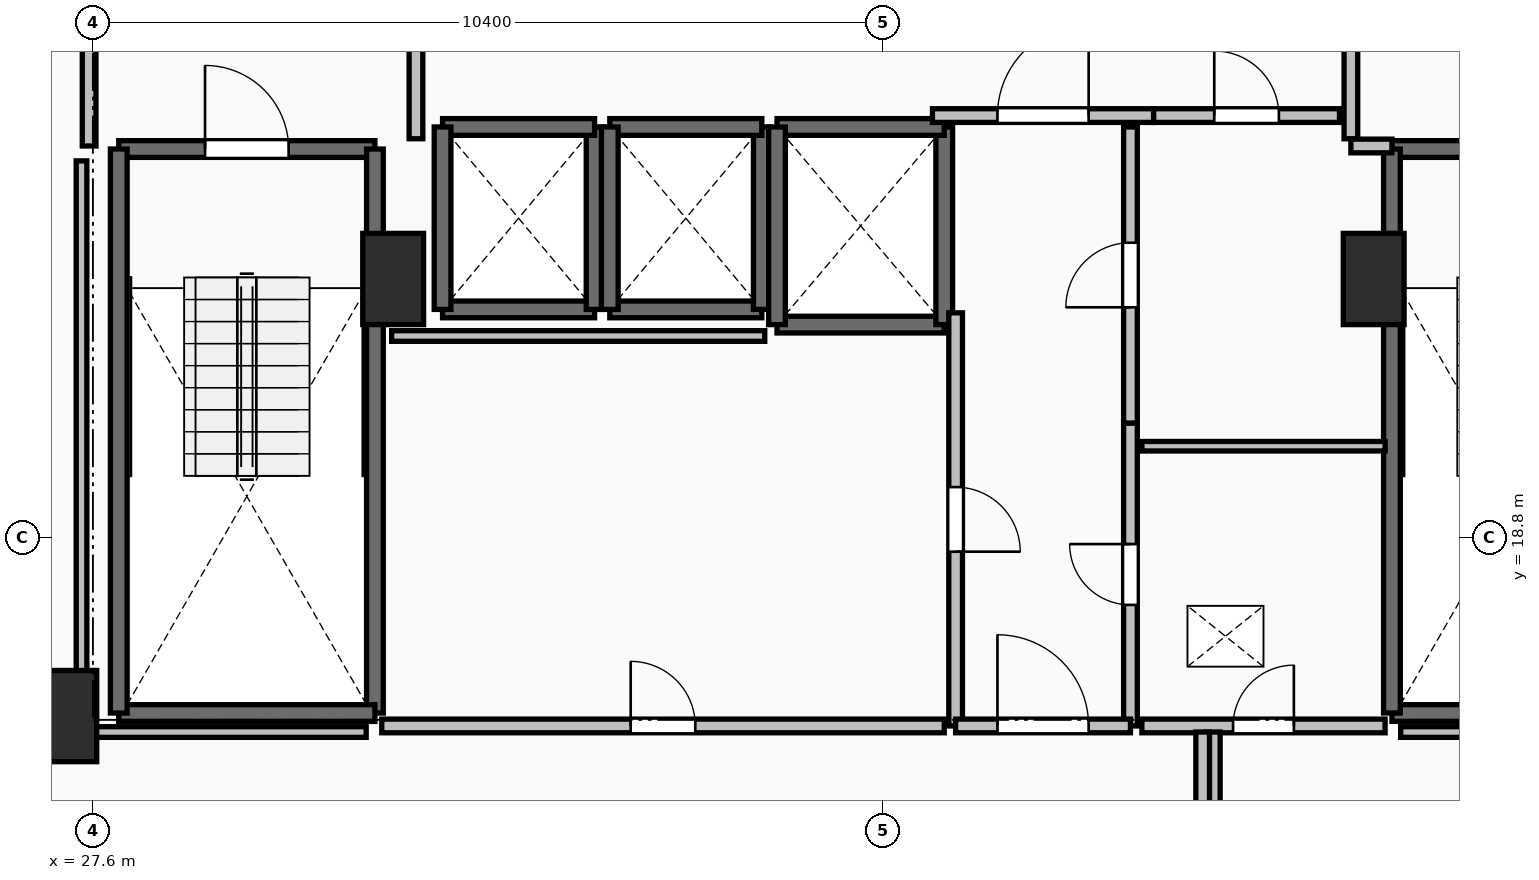
"""IFC4 building model, lengths in metres.
Left out: names, types, materials, properties, quantities, classifications, styles, units other than length and angle.
Written with IfcOpenShell. Run it as: python <this file> out.ifc"""

import sys

from ifc_helpers import new_model, si_unit, direction, frame, frame_2d, origin, origin_2d, place, context, subcontext, project, spatial, rectangle, extrude, element, fill, save


model = new_model("IFC4")
c1 = context("Model", 3, precision=1e-05, world=origin(), true_north=direction((0.0, 1.0)))
c2 = subcontext(c1, "Body", "Model", "MODEL_VIEW")
j1 = project(units=[si_unit("LENGTHUNIT", "METRE"), si_unit("PLANEANGLEUNIT", "RADIAN")], contexts=[c1])
p1 = place(None, origin())
s1 = spatial("IfcSite", under=j1, at=p1, CompositionType="ELEMENT")
p2 = place(p1, origin())
s2 = spatial("IfcBuilding", under=s1, at=p2, CompositionType="ELEMENT")
p3 = place(p2, frame((0.0, 0.0, 66.0)))
s3 = spatial("IfcBuildingStorey", under=s2, at=p3, CompositionType="ELEMENT", Elevation=66.0)
for number, where, z_axis, x_axis in (
    (1, (27.25, 16.45, 0.0), (0.0, 0.0, 1.0), (1.0, 0.0, 0.0)),
    (2, (31.55, 22.2, 0.0), (0.0, 0.0, 1.0), (1.0, 0.0, 0.0)),
    (3, (44.45, 22.2, 0.0), (0.0, 0.0, 1.0), (1.0, 0.0, 0.0)),
):
    element("IfcColumn", number, at=place(p3, frame(where, z_axis=z_axis, x_axis=x_axis)), inside=s3, PredefinedType="PILASTER", context=c2, shape_type="SweptSolid", body=[
        extrude(rectangle(XDim=0.8, YDim=1.2, at=origin_2d()), origin(), (0.0, 0.0, 1.0), 3.5),
    ])
p4 = place(p3, frame((27.94, 23.91, 0.0), z_axis=(0.0, 0.0, 1.0), x_axis=(1.0, 0.0, 0.0)))
e4 = element("IfcWall", 4, at=p4, inside=s3, PredefinedType="SOLIDWALL", context=c2, shape_type="SweptSolid", body=[
    extrude(rectangle(XDim=3.37, YDim=0.22, at=frame_2d((1.685, 0.0))), origin(), (0.0, 0.0, 1.0), 3.15),
])
p5 = place(p4, frame((1.135, 0.0, 0.0)))
e5 = element("IfcOpeningElement", 5, at=p5, cuts=e4, PredefinedType="OPENING", context=c2, shape_type="SweptSolid", body=[
    extrude(rectangle(XDim=1.1, YDim=2.15, at=frame_2d((0.55, 1.075))), frame((0.0, 0.125, 0.0), z_axis=(0.0, -1.0, 0.0), x_axis=(1.0, 0.0, 0.0)), (0.0, 0.0, 1.0), 0.25),
])
p6 = place(p3, frame((31.31, 23.91, 0.0), z_axis=(0.0, 0.0, 1.0), x_axis=(0.0, -1.0, 0.0)))
e6 = element("IfcWall", 6, at=p6, inside=s3, PredefinedType="SOLIDWALL", context=c2, shape_type="SweptSolid", body=[
    extrude(rectangle(XDim=7.42, YDim=0.22, at=frame_2d((3.71, 0.0))), origin(), (0.0, 0.0, 1.0), 3.15),
])
p7 = place(p3, frame((31.31, 16.49, 0.0), z_axis=(0.0, 0.0, 1.0), x_axis=(-1.0, 0.0, 0.0)))
e7 = element("IfcWall", 7, at=p7, inside=s3, PredefinedType="SOLIDWALL", context=c2, shape_type="SweptSolid", body=[
    extrude(rectangle(XDim=3.37, YDim=0.22, at=frame_2d((1.685, 0.0))), origin(), (0.0, 0.0, 1.0), 3.15),
])
p8 = place(p3, frame((27.94, 16.49, 0.0), z_axis=(0.0, 0.0, 1.0), x_axis=(0.0, 1.0, 0.0)))
e8 = element("IfcWall", 8, at=p8, inside=s3, PredefinedType="SOLIDWALL", context=c2, shape_type="SweptSolid", body=[
    extrude(rectangle(XDim=7.42, YDim=0.22, at=frame_2d((3.71, 0.0))), origin(), (0.0, 0.0, 1.0), 3.15),
])
p9 = place(p3, frame((44.69, 23.91, 0.0), z_axis=(0.0, 0.0, 1.0), x_axis=(1.0, 0.0, 0.0)))
e9 = element("IfcWall", 9, at=p9, inside=s3, PredefinedType="SOLIDWALL", context=c2, shape_type="SweptSolid", body=[
    extrude(rectangle(XDim=3.37, YDim=0.22, at=frame_2d((1.685, 0.0))), origin(), (0.0, 0.0, 1.0), 3.15),
])
p10 = place(p9, frame((1.135, 0.0, 0.0)))
e10 = element("IfcOpeningElement", 10, at=p10, cuts=e9, PredefinedType="OPENING", context=c2, shape_type="SweptSolid", body=[
    extrude(rectangle(XDim=1.1, YDim=2.15, at=frame_2d((0.55, 1.075))), frame((0.0, 0.125, 0.0), z_axis=(0.0, -1.0, 0.0), x_axis=(1.0, 0.0, 0.0)), (0.0, 0.0, 1.0), 0.25),
])
p11 = place(p3, frame((48.06, 16.49, 0.0), z_axis=(0.0, 0.0, 1.0), x_axis=(-1.0, 0.0, 0.0)))
e11 = element("IfcWall", 11, at=p11, inside=s3, PredefinedType="SOLIDWALL", context=c2, shape_type="SweptSolid", body=[
    extrude(rectangle(XDim=3.37, YDim=0.22, at=frame_2d((1.685, 0.0))), origin(), (0.0, 0.0, 1.0), 3.15),
])
p12 = place(p3, frame((44.69, 16.49, 0.0), z_axis=(0.0, 0.0, 1.0), x_axis=(0.0, 1.0, 0.0)))
e12 = element("IfcWall", 12, at=p12, inside=s3, PredefinedType="SOLIDWALL", context=c2, shape_type="SweptSolid", body=[
    extrude(rectangle(XDim=7.42, YDim=0.22, at=frame_2d((3.71, 0.0))), origin(), (0.0, 0.0, 1.0), 3.15),
])
p13 = place(p3, frame((32.2, 21.8, 0.0), z_axis=(0.0, 0.0, 1.0), x_axis=(1.0, 0.0, 0.0)))
e13 = element("IfcWall", 13, at=p13, inside=s3, PredefinedType="SOLIDWALL", context=c2, shape_type="SweptSolid", body=[
    extrude(rectangle(XDim=2.0, YDim=0.22, at=frame_2d((1.0, 0.0))), origin(), (0.0, 0.0, 1.0), 3.15),
])
p14 = place(p3, frame((34.2, 21.8, 0.0), z_axis=(0.0, 0.0, 1.0), x_axis=(0.0, 1.0, 0.0)))
e14 = element("IfcWall", 14, at=p14, inside=s3, PredefinedType="SOLIDWALL", context=c2, shape_type="SweptSolid", body=[
    extrude(rectangle(XDim=2.4, YDim=0.22, at=frame_2d((1.2, 0.0))), origin(), (0.0, 0.0, 1.0), 3.15),
])
p15 = place(p3, frame((34.2, 24.2, 0.0), z_axis=(0.0, 0.0, 1.0), x_axis=(-1.0, 0.0, 0.0)))
e15 = element("IfcWall", 15, at=p15, inside=s3, PredefinedType="SOLIDWALL", context=c2, shape_type="SweptSolid", body=[
    extrude(rectangle(XDim=2.0, YDim=0.22, at=frame_2d((1.0, 0.0))), origin(), (0.0, 0.0, 1.0), 3.15),
])
p16 = place(p3, frame((32.2, 24.2, 0.0), z_axis=(0.0, 0.0, 1.0), x_axis=(0.0, -1.0, 0.0)))
e16 = element("IfcWall", 16, at=p16, inside=s3, PredefinedType="SOLIDWALL", context=c2, shape_type="SweptSolid", body=[
    extrude(rectangle(XDim=2.4, YDim=0.22, at=frame_2d((1.2, 0.0))), origin(), (0.0, 0.0, 1.0), 3.15),
])
p17 = place(p3, frame((34.4, 21.8, 0.0), z_axis=(0.0, 0.0, 1.0), x_axis=(1.0, 0.0, 0.0)))
e17 = element("IfcWall", 17, at=p17, inside=s3, PredefinedType="SOLIDWALL", context=c2, shape_type="SweptSolid", body=[
    extrude(rectangle(XDim=2.0, YDim=0.22, at=frame_2d((1.0, 0.0))), origin(), (0.0, 0.0, 1.0), 3.15),
])
p18 = place(p3, frame((36.4, 21.8, 0.0), z_axis=(0.0, 0.0, 1.0), x_axis=(0.0, 1.0, 0.0)))
e18 = element("IfcWall", 18, at=p18, inside=s3, PredefinedType="SOLIDWALL", context=c2, shape_type="SweptSolid", body=[
    extrude(rectangle(XDim=2.4, YDim=0.22, at=frame_2d((1.2, 0.0))), origin(), (0.0, 0.0, 1.0), 3.15),
])
p19 = place(p3, frame((36.4, 24.2, 0.0), z_axis=(0.0, 0.0, 1.0), x_axis=(-1.0, 0.0, 0.0)))
e19 = element("IfcWall", 19, at=p19, inside=s3, PredefinedType="SOLIDWALL", context=c2, shape_type="SweptSolid", body=[
    extrude(rectangle(XDim=2.0, YDim=0.22, at=frame_2d((1.0, 0.0))), origin(), (0.0, 0.0, 1.0), 3.15),
])
p20 = place(p3, frame((34.4, 24.2, 0.0), z_axis=(0.0, 0.0, 1.0), x_axis=(0.0, -1.0, 0.0)))
e20 = element("IfcWall", 20, at=p20, inside=s3, PredefinedType="SOLIDWALL", context=c2, shape_type="SweptSolid", body=[
    extrude(rectangle(XDim=2.4, YDim=0.22, at=frame_2d((1.2, 0.0))), origin(), (0.0, 0.0, 1.0), 3.15),
])
p21 = place(p3, frame((36.6, 21.6, 0.0), z_axis=(0.0, 0.0, 1.0), x_axis=(1.0, 0.0, 0.0)))
e21 = element("IfcWall", 21, at=p21, inside=s3, PredefinedType="SOLIDWALL", context=c2, shape_type="SweptSolid", body=[
    extrude(rectangle(XDim=2.2, YDim=0.22, at=frame_2d((1.1, 0.0))), origin(), (0.0, 0.0, 1.0), 3.15),
])
p22 = place(p3, frame((38.8, 21.6, 0.0), z_axis=(0.0, 0.0, 1.0), x_axis=(0.0, 1.0, 0.0)))
e22 = element("IfcWall", 22, at=p22, inside=s3, PredefinedType="SOLIDWALL", context=c2, shape_type="SweptSolid", body=[
    extrude(rectangle(XDim=2.6, YDim=0.22, at=frame_2d((1.3, 0.0))), origin(), (0.0, 0.0, 1.0), 3.15),
])
p23 = place(p3, frame((38.8, 24.2, 0.0), z_axis=(0.0, 0.0, 1.0), x_axis=(-1.0, 0.0, 0.0)))
e23 = element("IfcWall", 23, at=p23, inside=s3, PredefinedType="SOLIDWALL", context=c2, shape_type="SweptSolid", body=[
    extrude(rectangle(XDim=2.2, YDim=0.22, at=frame_2d((1.1, 0.0))), origin(), (0.0, 0.0, 1.0), 3.15),
])
p24 = place(p3, frame((36.6, 24.2, 0.0), z_axis=(0.0, 0.0, 1.0), x_axis=(0.0, -1.0, 0.0)))
e24 = element("IfcWall", 24, at=p24, inside=s3, PredefinedType="SOLIDWALL", context=c2, shape_type="SweptSolid", body=[
    extrude(rectangle(XDim=2.6, YDim=0.22, at=frame_2d((1.3, 0.0))), origin(), (0.0, 0.0, 1.0), 3.15),
])
p25 = place(p3, frame((31.85, 24.045, 0.0), z_axis=(0.0, 0.0, 1.0), x_axis=(0.0, 1.0, 0.0)))
e25 = element("IfcWall", 25, at=p25, inside=s3, PredefinedType="PARTITIONING", context=c2, shape_type="SweptSolid", body=[
    extrude(rectangle(XDim=3.91, YDim=0.18, at=frame_2d((1.955, 0.0))), origin(), (0.0, 0.0, 1.0), 3.15),
])
p26 = place(p25, frame((1.355, 0.0, 0.0)))
e26 = element("IfcOpeningElement", 26, at=p26, cuts=e25, PredefinedType="OPENING", context=c2, shape_type="SweptSolid", body=[
    extrude(rectangle(XDim=1.2, YDim=2.15, at=frame_2d((0.6, 1.075))), frame((0.0, 0.105, 0.0), z_axis=(0.0, -1.0, 0.0), x_axis=(1.0, 0.0, 0.0)), (0.0, 0.0, 1.0), 0.21),
])
p27 = place(p3, frame((27.55, 28.0, 0.0), z_axis=(0.0, 0.0, 1.0), x_axis=(0.0, -1.0, 0.0)))
e27 = element("IfcWall", 27, at=p27, inside=s3, PredefinedType="PARTITIONING", context=c2, shape_type="SweptSolid", body=[
    extrude(rectangle(XDim=4.05, YDim=0.18, at=frame_2d((2.025, 0.0))), origin(), (0.0, 0.0, 1.0), 3.15),
])
p28 = place(p27, frame((1.425, 0.0, 0.0)))
e28 = element("IfcOpeningElement", 28, at=p28, cuts=e27, PredefinedType="OPENING", context=c2, shape_type="SweptSolid", body=[
    extrude(rectangle(XDim=1.2, YDim=2.15, at=frame_2d((0.6, 1.075))), frame((0.0, 0.105, 0.0), z_axis=(0.0, -1.0, 0.0), x_axis=(1.0, 0.0, 0.0)), (0.0, 0.0, 1.0), 0.21),
])
p29 = place(p3, frame((44.15, 27.955, 0.0), z_axis=(0.0, 0.0, 1.0), x_axis=(0.0, -1.0, 0.0)))
e29 = element("IfcWall", 29, at=p29, inside=s3, PredefinedType="PARTITIONING", context=c2, shape_type="SweptSolid", body=[
    extrude(rectangle(XDim=3.91, YDim=0.18, at=frame_2d((1.955, 0.0))), origin(), (0.0, 0.0, 1.0), 3.15),
])
p30 = place(p29, frame((1.355, 0.0, 0.0)))
e30 = element("IfcOpeningElement", 30, at=p30, cuts=e29, PredefinedType="OPENING", context=c2, shape_type="SweptSolid", body=[
    extrude(rectangle(XDim=1.2, YDim=2.15, at=frame_2d((0.6, 1.075))), frame((0.0, 0.105, 0.0), z_axis=(0.0, -1.0, 0.0), x_axis=(1.0, 0.0, 0.0)), (0.0, 0.0, 1.0), 0.21),
])
p31 = place(p3, frame((44.15, 23.95, 0.0), z_axis=(0.0, 0.0, 1.0), x_axis=(1.0, 0.0, 0.0)))
e31 = element("IfcWall", 31, at=p31, inside=s3, PredefinedType="PARTITIONING", context=c2, shape_type="SweptSolid", body=[
    extrude(rectangle(XDim=0.54, YDim=0.18, at=frame_2d((0.27, 0.0))), origin(), (0.0, 0.0, 1.0), 3.15),
])
p32 = place(p3, frame((38.645, 24.35, 0.0), z_axis=(0.0, 0.0, 1.0), x_axis=(1.0, 0.0, 0.0)))
e32 = element("IfcWall", 32, at=p32, inside=s3, PredefinedType="PARTITIONING", context=c2, shape_type="SweptSolid", body=[
    extrude(rectangle(XDim=2.91, YDim=0.18, at=frame_2d((1.455, 0.0))), origin(), (0.0, 0.0, 1.0), 3.15),
])
p33 = place(p32, frame((0.855, 0.0, 0.0)))
e33 = element("IfcOpeningElement", 33, at=p33, cuts=e32, PredefinedType="OPENING", context=c2, shape_type="SweptSolid", body=[
    extrude(rectangle(XDim=1.2, YDim=2.15, at=frame_2d((0.6, 1.075))), frame((0.0, 0.105, 0.0), z_axis=(0.0, -1.0, 0.0), x_axis=(1.0, 0.0, 0.0)), (0.0, 0.0, 1.0), 0.21),
])
p34 = place(p3, frame((41.555, 24.35, 0.0), z_axis=(0.0, 0.0, 1.0), x_axis=(1.0, 0.0, 0.0)))
e34 = element("IfcWall", 34, at=p34, inside=s3, PredefinedType="PARTITIONING", context=c2, shape_type="SweptSolid", body=[
    extrude(rectangle(XDim=2.445, YDim=0.18, at=frame_2d((1.223, 0.0))), origin(), (0.0, 0.0, 1.0), 3.15),
])
p35 = place(p34, frame((0.798, 0.0, 0.0)))
e35 = element("IfcOpeningElement", 35, at=p35, cuts=e34, PredefinedType="OPENING", context=c2, shape_type="SweptSolid", body=[
    extrude(rectangle(XDim=0.85, YDim=2.1, at=frame_2d((0.425, 1.05))), frame((0.0, 0.105, 0.0), z_axis=(0.0, -1.0, 0.0), x_axis=(1.0, 0.0, 0.0)), (0.0, 0.0, 1.0), 0.21),
])
p36 = place(p3, frame((41.25, 16.32, 0.0), z_axis=(0.0, 0.0, 1.0), x_axis=(0.0, 1.0, 0.0)))
e36 = element("IfcWall", 36, at=p36, inside=s3, PredefinedType="PARTITIONING", context=c2, shape_type="SweptSolid", body=[
    extrude(rectangle(XDim=3.985, YDim=0.18, at=frame_2d((1.992, 0.0))), origin(), (0.0, 0.0, 1.0), 3.15),
])
p37 = place(p36, frame((1.593, 0.0, 0.0)))
e37 = element("IfcOpeningElement", 37, at=p37, cuts=e36, PredefinedType="OPENING", context=c2, shape_type="SweptSolid", body=[
    extrude(rectangle(XDim=0.8, YDim=2.05, at=frame_2d((0.4, 1.025))), frame((0.0, 0.105, 0.0), z_axis=(0.0, -1.0, 0.0), x_axis=(1.0, 0.0, 0.0)), (0.0, 0.0, 1.0), 0.21),
])
p38 = place(p3, frame((41.25, 20.305, 0.0), z_axis=(0.0, 0.0, 1.0), x_axis=(0.0, 1.0, 0.0)))
e38 = element("IfcWall", 38, at=p38, inside=s3, PredefinedType="PARTITIONING", context=c2, shape_type="SweptSolid", body=[
    extrude(rectangle(XDim=3.895, YDim=0.18, at=frame_2d((1.948, 0.0))), origin(), (0.0, 0.0, 1.0), 3.15),
])
p39 = place(p38, frame((1.522, 0.0, 0.0)))
e39 = element("IfcOpeningElement", 39, at=p39, cuts=e38, PredefinedType="OPENING", context=c2, shape_type="SweptSolid", body=[
    extrude(rectangle(XDim=0.85, YDim=2.1, at=frame_2d((0.425, 1.05))), frame((0.0, 0.105, 0.0), z_axis=(0.0, -1.0, 0.0), x_axis=(1.0, 0.0, 0.0)), (0.0, 0.0, 1.0), 0.21),
])
p40 = place(p3, frame((38.95, 21.755, 0.0), z_axis=(0.0, 0.0, 1.0), x_axis=(0.0, -1.0, 0.0)))
e40 = element("IfcWall", 40, at=p40, inside=s3, PredefinedType="PARTITIONING", context=c2, shape_type="SweptSolid", body=[
    extrude(rectangle(XDim=5.435, YDim=0.18, at=frame_2d((2.717, 0.0))), origin(), (0.0, 0.0, 1.0), 3.15),
])
p41 = place(p40, frame((2.292, 0.0, 0.0)))
e41 = element("IfcOpeningElement", 41, at=p41, cuts=e40, PredefinedType="OPENING", context=c2, shape_type="SweptSolid", body=[
    extrude(rectangle(XDim=0.85, YDim=2.1, at=frame_2d((0.425, 1.05))), frame((0.0, 0.105, 0.0), z_axis=(0.0, -1.0, 0.0), x_axis=(1.0, 0.0, 0.0)), (0.0, 0.0, 1.0), 0.21),
])
p42 = place(p3, frame((38.95, 16.32, 0.0), z_axis=(0.0, 0.0, 1.0), x_axis=(1.0, 0.0, 0.0)))
e42 = element("IfcWall", 42, at=p42, inside=s3, PredefinedType="PARTITIONING", context=c2, shape_type="SweptSolid", body=[
    extrude(rectangle(XDim=2.3, YDim=0.18, at=frame_2d((1.15, 0.0))), origin(), (0.0, 0.0, 1.0), 3.15),
])
p43 = place(p42, frame((0.55, 0.0, 0.0)))
e43 = element("IfcOpeningElement", 43, at=p43, cuts=e42, PredefinedType="OPENING", context=c2, shape_type="SweptSolid", body=[
    extrude(rectangle(XDim=1.2, YDim=2.15, at=frame_2d((0.6, 1.075))), frame((0.0, 0.105, 0.0), z_axis=(0.0, -1.0, 0.0), x_axis=(1.0, 0.0, 0.0)), (0.0, 0.0, 1.0), 0.21),
])
p44 = place(p3, frame((44.6, 20.0, 0.0), z_axis=(0.0, 0.0, 1.0), x_axis=(-1.0, 0.0, 0.0)))
e44 = element("IfcWall", 44, at=p44, inside=s3, PredefinedType="PARTITIONING", context=c2, shape_type="SweptSolid", body=[
    extrude(rectangle(XDim=3.2, YDim=0.125, at=frame_2d((1.6, 0.0))), origin(), (0.0, 0.0, 1.0), 3.15),
])
p45 = place(p3, frame((41.4, 16.32, 0.0), z_axis=(0.0, 0.0, 1.0), x_axis=(1.0, 0.0, 0.0)))
e45 = element("IfcWall", 45, at=p45, inside=s3, PredefinedType="PARTITIONING", context=c2, shape_type="SweptSolid", body=[
    extrude(rectangle(XDim=3.2, YDim=0.18, at=frame_2d((1.6, 0.0))), origin(), (0.0, 0.0, 1.0), 3.15),
])
p46 = place(p45, frame((1.2, 0.0, 0.0)))
e46 = element("IfcOpeningElement", 46, at=p46, cuts=e45, PredefinedType="OPENING", context=c2, shape_type="SweptSolid", body=[
    extrude(rectangle(XDim=0.8, YDim=2.05, at=frame_2d((0.4, 1.025))), frame((0.0, 0.105, 0.0), z_axis=(0.0, -1.0, 0.0), x_axis=(1.0, 0.0, 0.0)), (0.0, 0.0, 1.0), 0.21),
])
p47 = place(p3, frame((31.4, 16.32, 0.0), z_axis=(0.0, 0.0, 1.0), x_axis=(1.0, 0.0, 0.0)))
e47 = element("IfcWall", 47, at=p47, inside=s3, PredefinedType="PARTITIONING", context=c2, shape_type="SweptSolid", body=[
    extrude(rectangle(XDim=7.4, YDim=0.18, at=frame_2d((3.7, 0.0))), origin(), (0.0, 0.0, 1.0), 3.15),
])
p48 = place(p47, frame((3.275, 0.0, 0.0)))
e48 = element("IfcOpeningElement", 48, at=p48, cuts=e47, PredefinedType="OPENING", context=c2, shape_type="SweptSolid", body=[
    extrude(rectangle(XDim=0.85, YDim=2.1, at=frame_2d((0.425, 1.05))), frame((0.0, 0.105, 0.0), z_axis=(0.0, -1.0, 0.0), x_axis=(1.0, 0.0, 0.0)), (0.0, 0.0, 1.0), 0.21),
])
for number, where, z_axis, x_axis in (
    (49, (42.34, 16.24, 0.0), (0.0, 0.0, 1.0), (0.0, -1.0, 0.0)),
    (50, (42.2, 14.1, 0.0), (0.0, 0.0, 1.0), (0.0, 1.0, 0.0)),
):
    element("IfcWall", number, at=place(p3, frame(where, z_axis=z_axis, x_axis=x_axis)), inside=s3, PredefinedType="PARTITIONING", context=c2, shape_type="SweptSolid", body=[
        extrude(rectangle(XDim=2.14, YDim=0.18, at=frame_2d((1.07, 0.0))), origin(), (0.0, 0.0, 1.0), 3.15),
    ])
p49 = place(p3, frame((36.439, 21.45, 0.0), z_axis=(0.0, 0.0, 1.0), x_axis=(-1.0, 0.0, 0.0)))
e51 = element("IfcWall", 51, at=p49, inside=s3, PredefinedType="PARTITIONING", context=c2, shape_type="SweptSolid", body=[
    extrude(rectangle(XDim=4.909, YDim=0.14, at=frame_2d((2.455, 0.0))), origin(), (0.0, 0.0, 1.0), 3.15),
])
for number, where, z_axis, x_axis in (
    (52, (48.55, 16.24, 0.0), (0.0, 0.0, 1.0), (-1.0, 0.0, 0.0)),
    (53, (31.195, 16.24, 0.0), (0.0, 0.0, 1.0), (-1.0, 0.0, 0.0)),
):
    element("IfcWall", number, at=place(p3, frame(where, z_axis=z_axis, x_axis=x_axis)), inside=s3, PredefinedType="PARTITIONING", context=c2, shape_type="SweptSolid", body=[
        extrude(rectangle(XDim=3.745, YDim=0.14, at=frame_2d((1.873, 0.0))), origin(), (0.0, 0.0, 1.0), 2.342),
    ])
p50 = place(p3, frame((27.45, 16.24, 0.0), z_axis=(0.0, 0.0, 1.0), x_axis=(0.0, 1.0, 0.0)))
e54 = element("IfcWall", 54, at=p50, inside=s3, PredefinedType="PARTITIONING", context=c2, shape_type="SweptSolid", body=[
    extrude(rectangle(XDim=7.514, YDim=0.14, at=frame_2d((3.757, 0.0))), origin(), (0.0, 0.0, 1.0), 2.342),
])
p51 = place(p5, origin())
e55 = element("IfcDoor", 55, at=p51, inside=s3, OperationType="SINGLE_SWING_LEFT", PredefinedType="DOOR", context=c2, shape_type="SweptSolid", body=[
    extrude(rectangle(XDim=1.1, YDim=2.15, at=frame_2d((0.55, 1.075))), frame((0.0, 0.025, 0.0), z_axis=(0.0, -1.0, 0.0), x_axis=(1.0, 0.0, 0.0)), (0.0, 0.0, 1.0), 0.05),
])
fill(e5, e55)
p52 = place(p33, origin())
e56 = element("IfcDoor", 56, at=p52, inside=s3, OperationType="SINGLE_SWING_RIGHT", PredefinedType="DOOR", context=c2, shape_type="SweptSolid", body=[
    extrude(rectangle(XDim=1.2, YDim=2.15, at=frame_2d((0.6, 1.075))), frame((0.0, 0.025, 0.0), z_axis=(0.0, -1.0, 0.0), x_axis=(1.0, 0.0, 0.0)), (0.0, 0.0, 1.0), 0.05),
])
fill(e33, e56)
p53 = place(p35, origin())
e57 = element("IfcDoor", 57, at=p53, inside=s3, OperationType="SINGLE_SWING_LEFT", PredefinedType="DOOR", context=c2, shape_type="SweptSolid", body=[
    extrude(rectangle(XDim=0.85, YDim=2.1, at=frame_2d((0.425, 1.05))), frame((0.0, 0.025, 0.0), z_axis=(0.0, -1.0, 0.0), x_axis=(1.0, 0.0, 0.0)), (0.0, 0.0, 1.0), 0.05),
])
fill(e35, e57)
p54 = place(p37, origin())
e58 = element("IfcDoor", 58, at=p54, inside=s3, OperationType="SINGLE_SWING_RIGHT", PredefinedType="DOOR", context=c2, shape_type="SweptSolid", body=[
    extrude(rectangle(XDim=0.8, YDim=2.05, at=frame_2d((0.4, 1.025))), frame((0.0, 0.025, 0.0), z_axis=(0.0, -1.0, 0.0), x_axis=(1.0, 0.0, 0.0)), (0.0, 0.0, 1.0), 0.05),
])
fill(e37, e58)
p55 = place(p39, origin())
e59 = element("IfcDoor", 59, at=p55, inside=s3, OperationType="SINGLE_SWING_LEFT", PredefinedType="DOOR", context=c2, shape_type="SweptSolid", body=[
    extrude(rectangle(XDim=0.85, YDim=2.1, at=frame_2d((0.425, 1.05))), frame((0.0, 0.025, 0.0), z_axis=(0.0, -1.0, 0.0), x_axis=(1.0, 0.0, 0.0)), (0.0, 0.0, 1.0), 0.05),
])
fill(e39, e59)
p56 = place(p41, origin())
e60 = element("IfcDoor", 60, at=p56, inside=s3, OperationType="SINGLE_SWING_RIGHT", PredefinedType="DOOR", context=c2, shape_type="SweptSolid", body=[
    extrude(rectangle(XDim=0.85, YDim=2.1, at=frame_2d((0.425, 1.05))), frame((0.0, 0.025, 0.0), z_axis=(0.0, -1.0, 0.0), x_axis=(1.0, 0.0, 0.0)), (0.0, 0.0, 1.0), 0.05),
])
fill(e41, e60)
p57 = place(p43, origin())
e61 = element("IfcDoor", 61, at=p57, inside=s3, OperationType="SINGLE_SWING_LEFT", PredefinedType="DOOR", context=c2, shape_type="SweptSolid", body=[
    extrude(rectangle(XDim=1.2, YDim=2.15, at=frame_2d((0.6, 1.075))), frame((0.0, 0.025, 0.0), z_axis=(0.0, -1.0, 0.0), x_axis=(1.0, 0.0, 0.0)), (0.0, 0.0, 1.0), 0.05),
])
fill(e43, e61)
p58 = place(p46, origin())
e62 = element("IfcDoor", 62, at=p58, inside=s3, OperationType="SINGLE_SWING_RIGHT", PredefinedType="DOOR", context=c2, shape_type="SweptSolid", body=[
    extrude(rectangle(XDim=0.8, YDim=2.05, at=frame_2d((0.4, 1.025))), frame((0.0, 0.025, 0.0), z_axis=(0.0, -1.0, 0.0), x_axis=(1.0, 0.0, 0.0)), (0.0, 0.0, 1.0), 0.05),
])
fill(e46, e62)
p59 = place(p48, origin())
e63 = element("IfcDoor", 63, at=p59, inside=s3, OperationType="SINGLE_SWING_LEFT", PredefinedType="DOOR", context=c2, shape_type="SweptSolid", body=[
    extrude(rectangle(XDim=0.85, YDim=2.1, at=frame_2d((0.425, 1.05))), frame((0.0, 0.025, 0.0), z_axis=(0.0, -1.0, 0.0), x_axis=(1.0, 0.0, 0.0)), (0.0, 0.0, 1.0), 0.05),
])
fill(e48, e63)
save(model, sys.argv[1])
